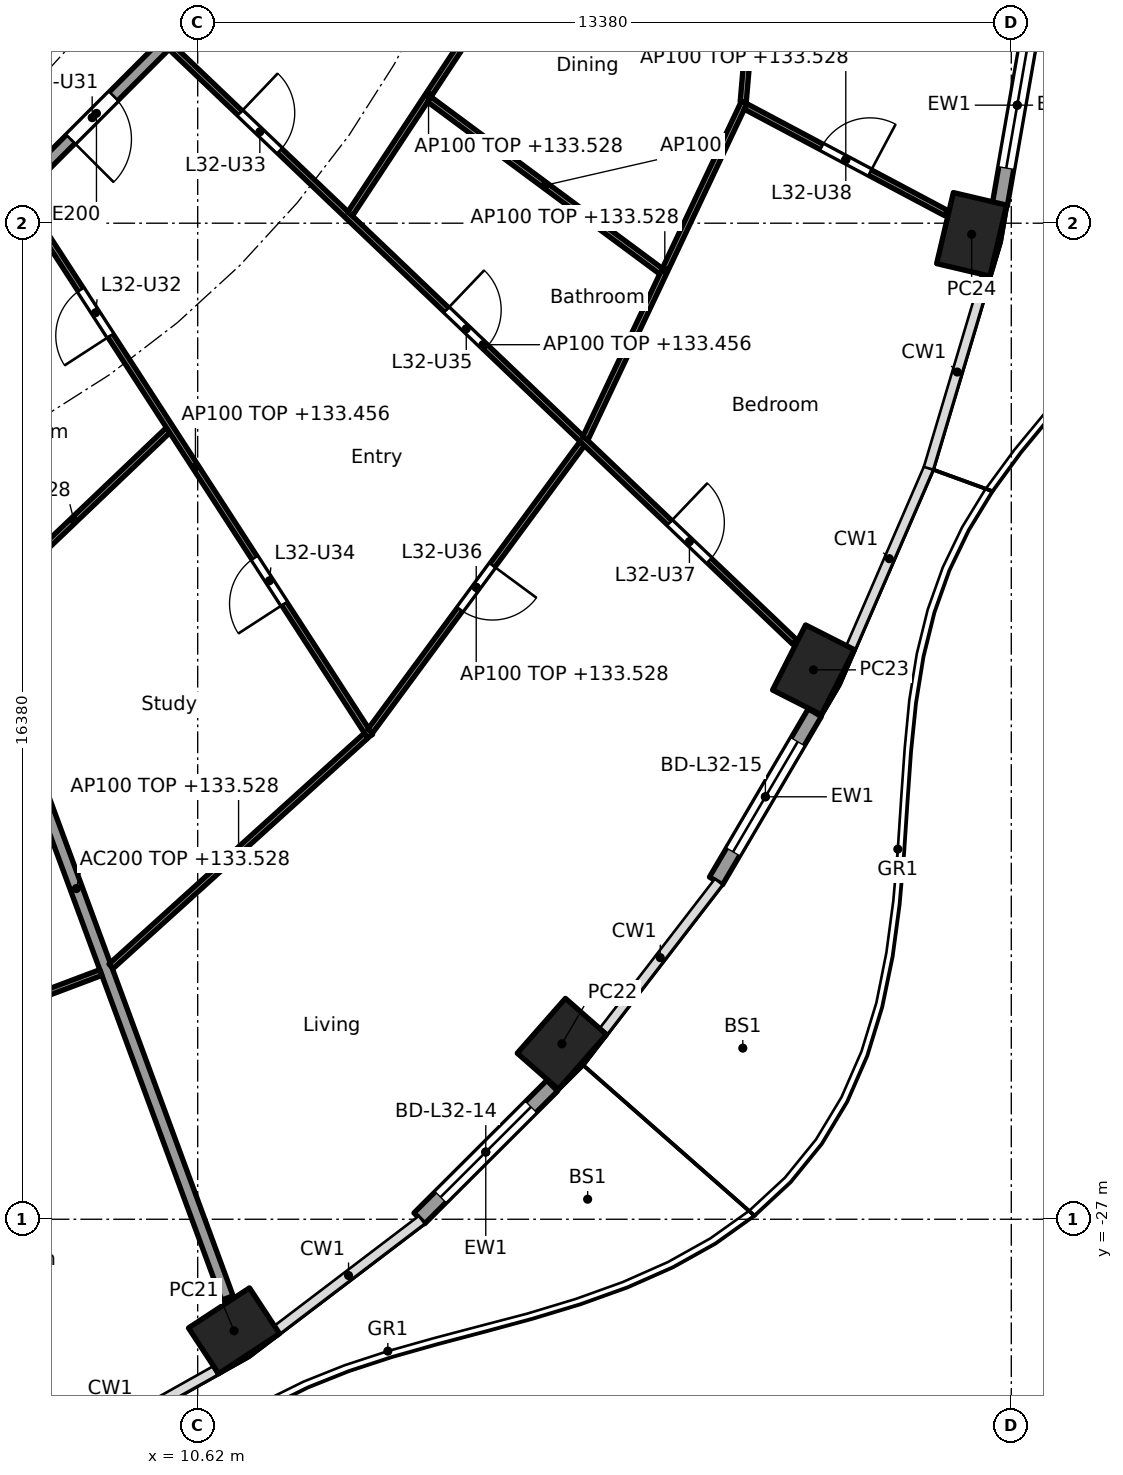
"""IFC4 building model, lengths in metres.
Left out: names, types, materials, properties, quantities, classifications, styles, units other than length and angle.
Written with IfcOpenShell. Run it as: python <this file> out.ifc"""

import sys

from ifc_helpers import new_model, si_unit, direction, frame, frame_2d, origin, origin_2d, place, context, subcontext, project, spatial, rectangle, hollow_rectangle, extrude, element, fill, save


model = new_model("IFC4")
c1 = context("Model", 3, precision=1e-05, world=origin(), true_north=direction((0.0, 1.0)))
c2 = subcontext(c1, "Body", "Model", "MODEL_VIEW")
j1 = project(units=[si_unit("LENGTHUNIT", "METRE"), si_unit("PLANEANGLEUNIT", "RADIAN")], contexts=[c1])
p1 = place(None, origin())
s1 = spatial("IfcSite", under=j1, at=p1, CompositionType="ELEMENT")
p2 = place(p1, origin())
s2 = spatial("IfcBuilding", under=s1, at=p2, CompositionType="ELEMENT")
p3 = place(p2, frame((0.0, 0.0, 130.7)))
s3 = spatial("IfcBuildingStorey", under=s2, at=p3, CompositionType="ELEMENT", Elevation=130.7)
for number, where, z_axis, x_axis in (
    (1, (11.218, -28.834, 0.0), (0.0, 0.0, 1.0), (0.836, 0.549, 0.0)),
    (2, (16.61, -24.115, 0.0), (0.0, 0.0, 1.0), (0.66, 0.751, 0.0)),
    (3, (20.747, -17.965, 0.0), (0.0, 0.0, 1.0), (0.452, 0.892, 0.0)),
    (4, (23.348, -10.803, 0.0), (0.0, 0.0, 1.0), (0.229, 0.973, 0.0)),
):
    element("IfcColumn", number, at=place(p3, frame(where, z_axis=z_axis, x_axis=x_axis)), inside=s3, PredefinedType="COLUMN", context=c2, shape_type="SweptSolid", body=[
        extrude(hollow_rectangle(XDim=1.2, YDim=0.9, WallThickness=0.04, at=origin_2d()), origin(), (0.0, 0.0, 1.0), 3.7),
    ])
p4 = place(p3, frame((16.45, -24.804, 0.0), z_axis=(0.0, 0.0, 1.0), x_axis=(-0.707857739375, -0.706355024621, 0.0)))
e5 = element("IfcWall", 5, at=p4, inside=s3, PredefinedType="SOLIDWALL", context=c2, shape_type="SweptSolid", body=[
    extrude(rectangle(XDim=3.087, YDim=0.25, at=frame_2d((1.543, 0.0))), origin(), (0.0, 0.0, 1.0), 3.44),
])
p5 = place(p4, frame((0.493, 0.0, 0.0)))
e6 = element("IfcOpeningElement", 6, at=p5, cuts=e5, PredefinedType="OPENING", context=c2, shape_type="SweptSolid", body=[
    extrude(rectangle(XDim=2.1, YDim=2.4, at=frame_2d((1.05, 1.2))), frame((0.0, 0.135, 0.0), z_axis=(0.0, -1.0, 0.0), x_axis=(1.0, 0.0, 0.0)), (0.0, 0.0, 1.0), 0.27),
])
p6 = place(p3, frame((20.768, -18.669, 0.0), z_axis=(0.0, 0.0, 1.0), x_axis=(-0.506314982873, -0.862348617508, 0.0)))
e7 = element("IfcWall", 7, at=p6, inside=s3, PredefinedType="SOLIDWALL", context=c2, shape_type="SweptSolid", body=[
    extrude(rectangle(XDim=3.208, YDim=0.25, at=frame_2d((1.604, 0.0))), origin(), (0.0, 0.0, 1.0), 3.44),
])
p7 = place(p6, frame((0.554, 0.0, 0.0)))
e8 = element("IfcOpeningElement", 8, at=p7, cuts=e7, PredefinedType="OPENING", context=c2, shape_type="SweptSolid", body=[
    extrude(rectangle(XDim=2.1, YDim=2.4, at=frame_2d((1.05, 1.2))), frame((0.0, 0.135, 0.0), z_axis=(0.0, -1.0, 0.0), x_axis=(1.0, 0.0, 0.0)), (0.0, 0.0, 1.0), 0.27),
])
p8 = place(p3, frame((24.385, -7.037, 0.0), z_axis=(0.0, 0.0, 1.0), x_axis=(-0.172163521006, -0.985068384446, 0.0)))
e9 = element("IfcWall", 9, at=p8, inside=s3, PredefinedType="SOLIDWALL", context=c2, shape_type="SweptSolid", body=[
    extrude(rectangle(XDim=3.333, YDim=0.25, at=frame_2d((1.666, 0.0))), origin(), (0.0, 0.0, 1.0), 3.44),
])
p9 = place(p8, frame((0.616, 0.0, 0.0)))
e10 = element("IfcOpeningElement", 10, at=p9, cuts=e9, PredefinedType="OPENING", context=c2, shape_type="SweptSolid", body=[
    extrude(rectangle(XDim=2.1, YDim=2.4, at=frame_2d((1.05, 1.2))), frame((0.0, 0.135, 0.0), z_axis=(0.0, -1.0, 0.0), x_axis=(1.0, 0.0, 0.0)), (0.0, 0.0, 1.0), 0.27),
])
p10 = place(p3, frame((4.613, -9.988, 0.0), z_axis=(0.0, 0.0, 1.0), x_axis=(0.707106781187, 0.707106781187, 0.0)))
e11 = element("IfcWall", 11, at=p10, inside=s3, PredefinedType="SHEAR", context=c2, shape_type="SweptSolid", body=[
    extrude(rectangle(XDim=7.602, YDim=0.6, at=frame_2d((3.801, 0.0))), origin(), (0.0, 0.0, 1.0), 3.44),
])
p11 = place(p10, frame((3.201, 0.0, 0.0)))
e12 = element("IfcOpeningElement", 12, at=p11, cuts=e11, PredefinedType="OPENING", context=c2, shape_type="SweptSolid", body=[
    extrude(rectangle(XDim=1.2, YDim=2.1, at=frame_2d((0.6, 1.05))), frame((0.0, 0.31, 0.0), z_axis=(0.0, -1.0, 0.0), x_axis=(1.0, 0.0, 0.0)), (0.0, 0.0, 1.0), 0.62),
])
p12 = place(p3, frame((6.14, -14.829, 0.0), z_axis=(0.0, 0.0, 1.0), x_axis=(0.346169582481, -0.938171956608, 0.0)))
e13 = element("IfcWall", 13, at=p12, inside=s3, PredefinedType="PARTITIONING", context=c2, shape_type="SweptSolid", body=[
    extrude(rectangle(XDim=14.354, YDim=0.2, at=frame_2d((7.177, 0.0))), origin(), (0.0, 0.0, 1.0), 2.828),
])
p13 = place(p3, frame((5.275, -12.494, 0.0), z_axis=(0.0, 0.0, 1.0), x_axis=(0.707106781187, 0.707106781187, 0.0)))
e14 = element("IfcWall", 14, at=p13, inside=s3, PredefinedType="PARTITIONING", context=c2, shape_type="SweptSolid", body=[
    extrude(rectangle(XDim=10.409, YDim=0.2, at=frame_2d((5.205, 0.0))), origin(), (0.0, 0.0, 1.0), 3.44),
])
p14 = place(p13, frame((4.604, 0.0, 0.0)))
e15 = element("IfcOpeningElement", 15, at=p14, cuts=e14, PredefinedType="OPENING", context=c2, shape_type="SweptSolid", body=[
    extrude(rectangle(XDim=1.0, YDim=2.1, at=frame_2d((0.5, 1.05))), frame((0.0, 0.11, 0.0), z_axis=(0.0, -1.0, 0.0), x_axis=(1.0, 0.0, 0.0)), (0.0, 0.0, 1.0), 0.22),
])
p15 = place(p3, frame((20.106, -2.642, 0.0), z_axis=(0.0, 0.0, 1.0), x_axis=(-0.085672025822, -0.996323393277, 0.0)))
e16 = element("IfcWall", 16, at=p15, inside=s3, PredefinedType="PARTITIONING", context=c2, shape_type="SweptSolid", body=[
    extrude(rectangle(XDim=6.007, YDim=0.1, at=frame_2d((3.003, 0.0))), origin(), (0.0, 0.0, 1.0), 2.828),
])
p16 = place(p15, frame((2.554, 0.0, 0.0)))
e17 = element("IfcOpeningElement", 17, at=p16, cuts=e16, PredefinedType="OPENING", context=c2, shape_type="SweptSolid", body=[
    extrude(rectangle(XDim=0.9, YDim=2.1, at=frame_2d((0.45, 1.05))), frame((0.0, 0.06, 0.0), z_axis=(0.0, -1.0, 0.0), x_axis=(1.0, 0.0, 0.0)), (0.0, 0.0, 1.0), 0.12),
])
p17 = place(p3, frame((4.178, -24.773, 0.0), z_axis=(0.0, 0.0, 1.0), x_axis=(0.935583811437, 0.353104703702, 0.0)))
e18 = element("IfcWall", 18, at=p17, inside=s3, PredefinedType="PARTITIONING", context=c2, shape_type="SweptSolid", body=[
    extrude(rectangle(XDim=5.184, YDim=0.1, at=frame_2d((2.592, 0.0))), origin(), (0.0, 0.0, 1.0), 2.828),
])
p18 = place(p3, frame((7.032, -16.98, 0.0), z_axis=(0.0, 0.0, 1.0), x_axis=(0.723709759148, 0.690104473622, 0.0)))
e19 = element("IfcWall", 19, at=p18, inside=s3, PredefinedType="PARTITIONING", context=c2, shape_type="SweptSolid", body=[
    extrude(rectangle(XDim=4.286, YDim=0.1, at=frame_2d((2.143, 0.0))), origin(), (0.0, 0.0, 1.0), 2.828),
])
p19 = place(p3, frame((9.195, -22.84, 0.0), z_axis=(0.0, 0.0, 1.0), x_axis=(0.741675855479, 0.670758470241, 0.0)))
e20 = element("IfcWall", 20, at=p19, inside=s3, PredefinedType="PARTITIONING", context=c2, shape_type="SweptSolid", body=[
    extrude(rectangle(XDim=5.656, YDim=0.1, at=frame_2d((2.828, 0.0))), origin(), (0.0, 0.0, 1.0), 2.828),
])
p20 = place(p3, frame((7.712, -10.195, 0.0), z_axis=(0.0, 0.0, 1.0), x_axis=(0.543868615753, -0.839170381269, 0.0)))
e21 = element("IfcWall", 21, at=p20, inside=s3, PredefinedType="PARTITIONING", context=c2, shape_type="SweptSolid", body=[
    extrude(rectangle(XDim=10.558, YDim=0.1, at=frame_2d((5.279, 0.0))), origin(), (0.0, 0.0, 1.0), 2.756),
])
p21 = place(p20, frame((1.81, 0.0, 0.0)))
e22 = element("IfcOpeningElement", 22, at=p21, cuts=e21, PredefinedType="OPENING", context=c2, shape_type="SweptSolid", body=[
    extrude(rectangle(XDim=0.9, YDim=2.1, at=frame_2d((0.45, 1.05))), frame((0.0, 0.06, 0.0), z_axis=(0.0, -1.0, 0.0), x_axis=(1.0, 0.0, 0.0)), (0.0, 0.0, 1.0), 0.12),
])
p22 = place(p20, frame((7.064, 0.0, 0.0)))
e23 = element("IfcOpeningElement", 23, at=p22, cuts=e21, PredefinedType="OPENING", context=c2, shape_type="SweptSolid", body=[
    extrude(rectangle(XDim=0.9, YDim=2.1, at=frame_2d((0.45, 1.05))), frame((0.0, 0.06, 0.0), z_axis=(0.0, -1.0, 0.0), x_axis=(1.0, 0.0, 0.0)), (0.0, 0.0, 1.0), 0.12),
])
p23 = place(p3, frame((13.457, -18.973, 0.0), z_axis=(0.0, 0.0, 1.0), x_axis=(0.593532053206, 0.80481035146, 0.0)))
e24 = element("IfcWall", 24, at=p23, inside=s3, PredefinedType="PARTITIONING", context=c2, shape_type="SweptSolid", body=[
    extrude(rectangle(XDim=5.876, YDim=0.1, at=frame_2d((2.938, 0.0))), origin(), (0.0, 0.0, 1.0), 2.828),
])
p24 = place(p23, frame((2.488, 0.0, 0.0)))
e25 = element("IfcOpeningElement", 25, at=p24, cuts=e24, PredefinedType="OPENING", context=c2, shape_type="SweptSolid", body=[
    extrude(rectangle(XDim=0.9, YDim=2.1, at=frame_2d((0.45, 1.05))), frame((0.0, 0.06, 0.0), z_axis=(0.0, -1.0, 0.0), x_axis=(1.0, 0.0, 0.0)), (0.0, 0.0, 1.0), 0.12),
])
p25 = place(p3, frame((10.184, -7.727, 0.0), z_axis=(0.0, 0.0, 1.0), x_axis=(0.723635100101, -0.690182759783, 0.0)))
e26 = element("IfcWall", 26, at=p25, inside=s3, PredefinedType="PARTITIONING", context=c2, shape_type="SweptSolid", body=[
    extrude(rectangle(XDim=14.173, YDim=0.1, at=frame_2d((7.086, 0.0))), origin(), (0.0, 0.0, 1.0), 2.756),
])
p26 = place(p25, frame((1.565, 0.0, 0.0)))
e27 = element("IfcOpeningElement", 27, at=p26, cuts=e26, PredefinedType="OPENING", context=c2, shape_type="SweptSolid", body=[
    extrude(rectangle(XDim=0.9, YDim=2.1, at=frame_2d((0.45, 1.05))), frame((0.0, 0.06, 0.0), z_axis=(0.0, -1.0, 0.0), x_axis=(1.0, 0.0, 0.0)), (0.0, 0.0, 1.0), 0.12),
])
p27 = place(p25, frame((6.257, 0.0, 0.0)))
e28 = element("IfcOpeningElement", 28, at=p27, cuts=e26, PredefinedType="OPENING", context=c2, shape_type="SweptSolid", body=[
    extrude(rectangle(XDim=0.9, YDim=2.1, at=frame_2d((0.45, 1.05))), frame((0.0, 0.06, 0.0), z_axis=(0.0, -1.0, 0.0), x_axis=(1.0, 0.0, 0.0)), (0.0, 0.0, 1.0), 0.12),
])
p28 = place(p25, frame((11.328, 0.0, 0.0)))
e29 = element("IfcOpeningElement", 29, at=p28, cuts=e26, PredefinedType="OPENING", context=c2, shape_type="SweptSolid", body=[
    extrude(rectangle(XDim=0.9, YDim=2.1, at=frame_2d((0.45, 1.05))), frame((0.0, 0.06, 0.0), z_axis=(0.0, -1.0, 0.0), x_axis=(1.0, 0.0, 0.0)), (0.0, 0.0, 1.0), 0.12),
])
p29 = place(p3, frame((13.127, -10.467, 0.0), z_axis=(0.0, 0.0, 1.0), x_axis=(0.550614843759, 0.834759422727, 0.0)))
e30 = element("IfcWall", 30, at=p29, inside=s3, PredefinedType="PARTITIONING", context=c2, shape_type="SweptSolid", body=[
    extrude(rectangle(XDim=4.683, YDim=0.1, at=frame_2d((2.341, 0.0))), origin(), (0.0, 0.0, 1.0), 2.828),
])
p30 = place(p3, frame((16.995, -14.158, 0.0), z_axis=(0.0, 0.0, 1.0), x_axis=(0.427456178439, 0.904036069808, 0.0)))
e31 = element("IfcWall", 31, at=p30, inside=s3, PredefinedType="PARTITIONING", context=c2, shape_type="SweptSolid", body=[
    extrude(rectangle(XDim=6.113, YDim=0.1, at=frame_2d((3.057, 0.0))), origin(), (0.0, 0.0, 1.0), 2.828),
])
p31 = place(p3, frame((14.429, -8.583, 0.0), z_axis=(0.0, 0.0, 1.0), x_axis=(0.803162355549, -0.595760212358, 0.0)))
e32 = element("IfcWall", 32, at=p31, inside=s3, PredefinedType="PARTITIONING", context=c2, shape_type="SweptSolid", body=[
    extrude(rectangle(XDim=4.745, YDim=0.1, at=frame_2d((2.373, 0.0))), origin(), (0.0, 0.0, 1.0), 3.44),
])
p32 = place(p3, frame((19.631, -8.7, 0.0), z_axis=(0.0, 0.0, 1.0), x_axis=(0.883011478612, -0.469351391433, 0.0)))
e33 = element("IfcWall", 33, at=p32, inside=s3, PredefinedType="PARTITIONING", context=c2, shape_type="SweptSolid", body=[
    extrude(rectangle(XDim=3.731, YDim=0.1, at=frame_2d((1.865, 0.0))), origin(), (0.0, 0.0, 1.0), 2.828),
])
p33 = place(p32, frame((1.415, 0.0, 0.0)))
e34 = element("IfcOpeningElement", 34, at=p33, cuts=e33, PredefinedType="OPENING", context=c2, shape_type="SweptSolid", body=[
    extrude(rectangle(XDim=0.9, YDim=2.1, at=frame_2d((0.45, 1.05))), frame((0.0, 0.06, 0.0), z_axis=(0.0, -1.0, 0.0), x_axis=(1.0, 0.0, 0.0)), (0.0, 0.0, 1.0), 0.12),
])
p34 = place(p5, origin())
e35 = element("IfcDoor", 35, at=p34, inside=s3, OperationType="SLIDING_TO_LEFT", PredefinedType="DOOR", context=c2, shape_type="SweptSolid", body=[
    extrude(rectangle(XDim=2.1, YDim=2.4, at=frame_2d((1.05, 1.2))), frame((0.0, 0.025, 0.0), z_axis=(0.0, -1.0, 0.0), x_axis=(1.0, 0.0, 0.0)), (0.0, 0.0, 1.0), 0.05),
])
fill(e6, e35)
p35 = place(p7, origin())
e36 = element("IfcDoor", 36, at=p35, inside=s3, OperationType="SLIDING_TO_LEFT", PredefinedType="DOOR", context=c2, shape_type="SweptSolid", body=[
    extrude(rectangle(XDim=2.1, YDim=2.4, at=frame_2d((1.05, 1.2))), frame((0.0, 0.025, 0.0), z_axis=(0.0, -1.0, 0.0), x_axis=(1.0, 0.0, 0.0)), (0.0, 0.0, 1.0), 0.05),
])
fill(e8, e36)
p36 = place(p9, origin())
e37 = element("IfcDoor", 37, at=p36, inside=s3, OperationType="SLIDING_TO_LEFT", PredefinedType="DOOR", context=c2, shape_type="SweptSolid", body=[
    extrude(rectangle(XDim=2.1, YDim=2.4, at=frame_2d((1.05, 1.2))), frame((0.0, 0.025, 0.0), z_axis=(0.0, -1.0, 0.0), x_axis=(1.0, 0.0, 0.0)), (0.0, 0.0, 1.0), 0.05),
])
fill(e10, e37)
p37 = place(p14, frame((1.0, 0.0, 0.0), x_axis=(-1.0, 0.0, 0.0)))
e38 = element("IfcDoor", 38, at=p37, inside=s3, OperationType="SINGLE_SWING_RIGHT", PredefinedType="DOOR", context=c2, shape_type="SweptSolid", body=[
    extrude(rectangle(XDim=1.0, YDim=2.1, at=frame_2d((0.5, 1.05))), frame((0.0, 0.025, 0.0), z_axis=(0.0, -1.0, 0.0), x_axis=(1.0, 0.0, 0.0)), (0.0, 0.0, 1.0), 0.05),
])
fill(e15, e38)
p38 = place(p21, frame((0.9, 0.0, 0.0), x_axis=(-1.0, 0.0, 0.0)))
e39 = element("IfcDoor", 39, at=p38, inside=s3, OperationType="SINGLE_SWING_LEFT", PredefinedType="DOOR", context=c2, shape_type="SweptSolid", body=[
    extrude(rectangle(XDim=0.9, YDim=2.1, at=frame_2d((0.45, 1.05))), frame((0.0, 0.025, 0.0), z_axis=(0.0, -1.0, 0.0), x_axis=(1.0, 0.0, 0.0)), (0.0, 0.0, 1.0), 0.05),
])
fill(e22, e39)
p39 = place(p26, origin())
e40 = element("IfcDoor", 40, at=p39, inside=s3, OperationType="SINGLE_SWING_LEFT", PredefinedType="DOOR", context=c2, shape_type="SweptSolid", body=[
    extrude(rectangle(XDim=0.9, YDim=2.1, at=frame_2d((0.45, 1.05))), frame((0.0, 0.025, 0.0), z_axis=(0.0, -1.0, 0.0), x_axis=(1.0, 0.0, 0.0)), (0.0, 0.0, 1.0), 0.05),
])
fill(e27, e40)
p40 = place(p22, frame((0.9, 0.0, 0.0), x_axis=(-1.0, 0.0, 0.0)))
e41 = element("IfcDoor", 41, at=p40, inside=s3, OperationType="SINGLE_SWING_LEFT", PredefinedType="DOOR", context=c2, shape_type="SweptSolid", body=[
    extrude(rectangle(XDim=0.9, YDim=2.1, at=frame_2d((0.45, 1.05))), frame((0.0, 0.025, 0.0), z_axis=(0.0, -1.0, 0.0), x_axis=(1.0, 0.0, 0.0)), (0.0, 0.0, 1.0), 0.05),
])
fill(e23, e41)
p41 = place(p27, origin())
e42 = element("IfcDoor", 42, at=p41, inside=s3, OperationType="SINGLE_SWING_LEFT", PredefinedType="DOOR", context=c2, shape_type="SweptSolid", body=[
    extrude(rectangle(XDim=0.9, YDim=2.1, at=frame_2d((0.45, 1.05))), frame((0.0, 0.025, 0.0), z_axis=(0.0, -1.0, 0.0), x_axis=(1.0, 0.0, 0.0)), (0.0, 0.0, 1.0), 0.05),
])
fill(e28, e42)
p42 = place(p24, frame((0.9, 0.0, 0.0), x_axis=(-1.0, 0.0, 0.0)))
e43 = element("IfcDoor", 43, at=p42, inside=s3, OperationType="SINGLE_SWING_LEFT", PredefinedType="DOOR", context=c2, shape_type="SweptSolid", body=[
    extrude(rectangle(XDim=0.9, YDim=2.1, at=frame_2d((0.45, 1.05))), frame((0.0, 0.025, 0.0), z_axis=(0.0, -1.0, 0.0), x_axis=(1.0, 0.0, 0.0)), (0.0, 0.0, 1.0), 0.05),
])
fill(e25, e43)
p43 = place(p28, origin())
e44 = element("IfcDoor", 44, at=p43, inside=s3, OperationType="SINGLE_SWING_LEFT", PredefinedType="DOOR", context=c2, shape_type="SweptSolid", body=[
    extrude(rectangle(XDim=0.9, YDim=2.1, at=frame_2d((0.45, 1.05))), frame((0.0, 0.025, 0.0), z_axis=(0.0, -1.0, 0.0), x_axis=(1.0, 0.0, 0.0)), (0.0, 0.0, 1.0), 0.05),
])
fill(e29, e44)
p44 = place(p33, origin())
e45 = element("IfcDoor", 45, at=p44, inside=s3, OperationType="SINGLE_SWING_RIGHT", PredefinedType="DOOR", context=c2, shape_type="SweptSolid", body=[
    extrude(rectangle(XDim=0.9, YDim=2.1, at=frame_2d((0.45, 1.05))), frame((0.0, 0.025, 0.0), z_axis=(0.0, -1.0, 0.0), x_axis=(1.0, 0.0, 0.0)), (0.0, 0.0, 1.0), 0.05),
])
fill(e34, e45)
save(model, sys.argv[1])
